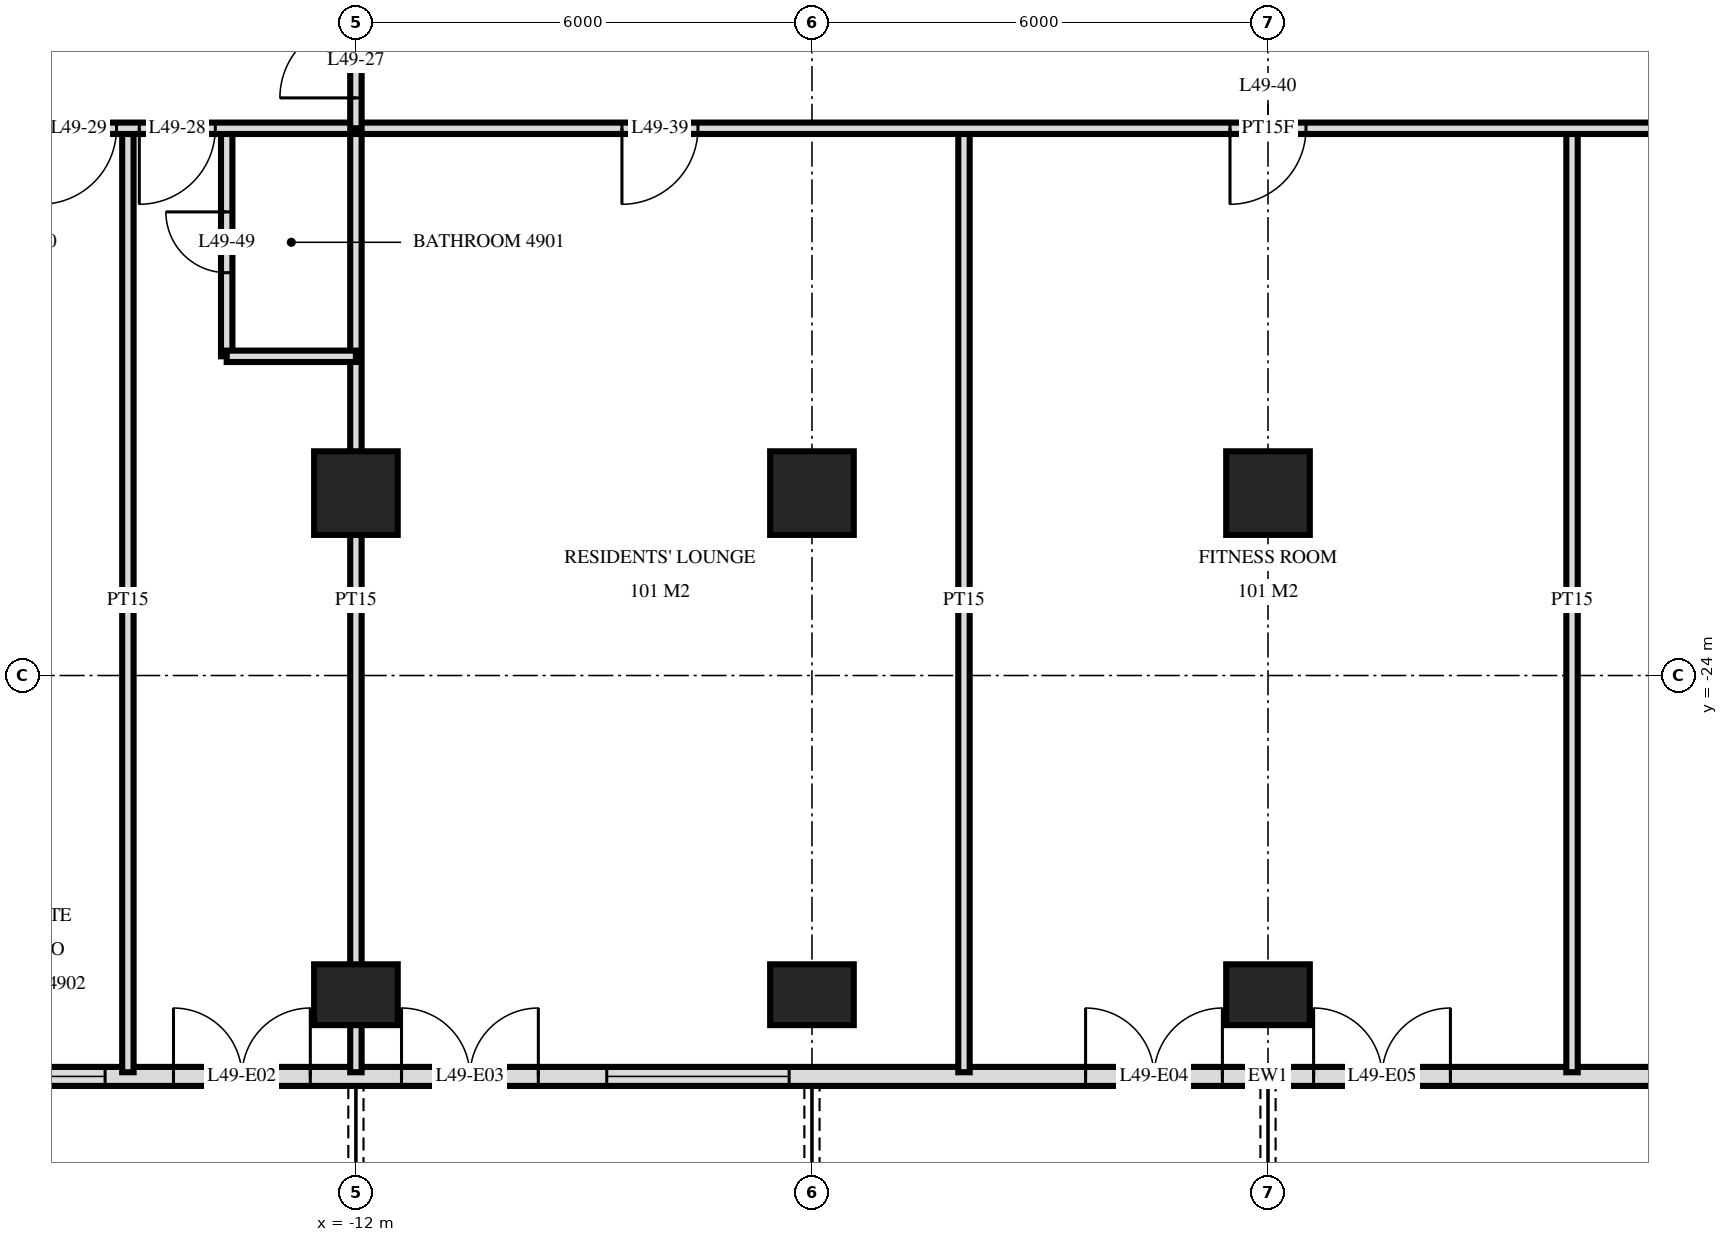
"""IFC4 building model, lengths in metres.
Left out: names, types, materials, properties, quantities, classifications, styles, units other than length and angle.
Written with IfcOpenShell. Run it as: python <this file> out.ifc"""

import sys

from ifc_helpers import new_model, si_unit, direction, frame, frame_2d, origin, origin_2d, place, context, subcontext, project, spatial, rectangle, extrude, element, fill, save


model = new_model("IFC4")
c1 = context("Model", 3, precision=1e-05, world=origin(), true_north=direction((0.0, 1.0)))
c2 = subcontext(c1, "Body", "Model", "MODEL_VIEW")
j1 = project(units=[si_unit("LENGTHUNIT", "METRE"), si_unit("PLANEANGLEUNIT", "RADIAN")], contexts=[c1])
p1 = place(None, origin())
s1 = spatial("IfcSite", under=j1, at=p1, CompositionType="ELEMENT")
p2 = place(p1, origin())
s2 = spatial("IfcBuilding", under=s1, at=p2, CompositionType="ELEMENT")
p3 = place(p2, frame((0.0, 0.0, 190.6)))
s3 = spatial("IfcBuildingStorey", under=s2, at=p3, CompositionType="ELEMENT", Elevation=190.6)
p4 = place(p3, frame((-12.0, -28.2, 0.0), z_axis=(0.0, 0.0, 1.0), x_axis=(1.0, 0.0, 0.0)))
e1 = element("IfcColumn", 1, at=p4, inside=s3, PredefinedType="COLUMN", context=c2, shape_type="SweptSolid", body=[
    extrude(rectangle(XDim=1.1, YDim=0.8, at=origin_2d()), origin(), (0.0, 0.0, 1.0), 3.5),
])
p5 = place(p3, frame((-12.0, -21.6, 0.0), z_axis=(0.0, 0.0, 1.0), x_axis=(1.0, 0.0, 0.0)))
e2 = element("IfcColumn", 2, at=p5, inside=s3, PredefinedType="COLUMN", context=c2, shape_type="SweptSolid", body=[
    extrude(rectangle(XDim=1.1, YDim=1.1, at=origin_2d()), origin(), (0.0, 0.0, 1.0), 3.5),
])
p6 = place(p3, frame((-6.0, -28.2, 0.0), z_axis=(0.0, 0.0, 1.0), x_axis=(1.0, 0.0, 0.0)))
e3 = element("IfcColumn", 3, at=p6, inside=s3, PredefinedType="COLUMN", context=c2, shape_type="SweptSolid", body=[
    extrude(rectangle(XDim=1.1, YDim=0.8, at=origin_2d()), origin(), (0.0, 0.0, 1.0), 3.5),
])
p7 = place(p3, frame((-6.0, -21.6, 0.0), z_axis=(0.0, 0.0, 1.0), x_axis=(1.0, 0.0, 0.0)))
e4 = element("IfcColumn", 4, at=p7, inside=s3, PredefinedType="COLUMN", context=c2, shape_type="SweptSolid", body=[
    extrude(rectangle(XDim=1.1, YDim=1.1, at=origin_2d()), origin(), (0.0, 0.0, 1.0), 3.5),
])
p8 = place(p3, frame((0.0, -28.2, 0.0), z_axis=(0.0, 0.0, 1.0), x_axis=(1.0, 0.0, 0.0)))
e5 = element("IfcColumn", 5, at=p8, inside=s3, PredefinedType="COLUMN", context=c2, shape_type="SweptSolid", body=[
    extrude(rectangle(XDim=1.1, YDim=0.8, at=origin_2d()), origin(), (0.0, 0.0, 1.0), 3.5),
])
p9 = place(p3, frame((0.0, -21.6, 0.0), z_axis=(0.0, 0.0, 1.0), x_axis=(1.0, 0.0, 0.0)))
e6 = element("IfcColumn", 6, at=p9, inside=s3, PredefinedType="COLUMN", context=c2, shape_type="SweptSolid", body=[
    extrude(rectangle(XDim=1.1, YDim=1.1, at=origin_2d()), origin(), (0.0, 0.0, 1.0), 3.5),
])
p10 = place(p3, frame((-22.475, -29.275, 0.0), z_axis=(0.0, 0.0, 1.0), x_axis=(1.0, 0.0, 0.0)))
e7 = element("IfcWall", 7, at=p10, inside=s3, PredefinedType="SOLIDWALL", context=c2, shape_type="SweptSolid", body=[
    extrude(rectangle(XDim=44.951, YDim=0.25, at=frame_2d((22.475, 0.0))), origin(), (0.0, 0.0, 1.0), 3.22),
])
p11 = place(p10, frame((0.575, 0.0, 0.0)))
e8 = element("IfcOpeningElement", 8, at=p11, cuts=e7, PredefinedType="OPENING", context=c2, shape_type="SweptSolid", body=[
    extrude(rectangle(XDim=1.8, YDim=2.4, at=frame_2d((0.9, 1.2))), frame((0.0, 0.135, 0.0), z_axis=(0.0, -1.0, 0.0), x_axis=(1.0, 0.0, 0.0)), (0.0, 0.0, 1.0), 0.27),
])
p12 = place(p10, frame((4.775, 0.0, 0.9)))
e9 = element("IfcOpeningElement", 9, at=p12, cuts=e7, PredefinedType="OPENING", context=c2, shape_type="SweptSolid", body=[
    extrude(rectangle(XDim=2.4, YDim=1.5, at=frame_2d((1.2, 0.75))), frame((0.0, 0.135, 0.0), z_axis=(0.0, -1.0, 0.0), x_axis=(1.0, 0.0, 0.0)), (0.0, 0.0, 1.0), 0.27),
])
p13 = place(p10, frame((8.075, 0.0, 0.0)))
e10 = element("IfcOpeningElement", 10, at=p13, cuts=e7, PredefinedType="OPENING", context=c2, shape_type="SweptSolid", body=[
    extrude(rectangle(XDim=1.8, YDim=2.4, at=frame_2d((0.9, 1.2))), frame((0.0, 0.135, 0.0), z_axis=(0.0, -1.0, 0.0), x_axis=(1.0, 0.0, 0.0)), (0.0, 0.0, 1.0), 0.27),
])
p14 = place(p10, frame((11.075, 0.0, 0.0)))
e11 = element("IfcOpeningElement", 11, at=p14, cuts=e7, PredefinedType="OPENING", context=c2, shape_type="SweptSolid", body=[
    extrude(rectangle(XDim=1.8, YDim=2.4, at=frame_2d((0.9, 1.2))), frame((0.0, 0.135, 0.0), z_axis=(0.0, -1.0, 0.0), x_axis=(1.0, 0.0, 0.0)), (0.0, 0.0, 1.0), 0.27),
])
p15 = place(p10, frame((13.775, 0.0, 0.9)))
e12 = element("IfcOpeningElement", 12, at=p15, cuts=e7, PredefinedType="OPENING", context=c2, shape_type="SweptSolid", body=[
    extrude(rectangle(XDim=2.4, YDim=1.5, at=frame_2d((1.2, 0.75))), frame((0.0, 0.135, 0.0), z_axis=(0.0, -1.0, 0.0), x_axis=(1.0, 0.0, 0.0)), (0.0, 0.0, 1.0), 0.27),
])
p16 = place(p10, frame((20.075, 0.0, 0.0)))
e13 = element("IfcOpeningElement", 13, at=p16, cuts=e7, PredefinedType="OPENING", context=c2, shape_type="SweptSolid", body=[
    extrude(rectangle(XDim=1.8, YDim=2.4, at=frame_2d((0.9, 1.2))), frame((0.0, 0.135, 0.0), z_axis=(0.0, -1.0, 0.0), x_axis=(1.0, 0.0, 0.0)), (0.0, 0.0, 1.0), 0.27),
])
p17 = place(p10, frame((23.075, 0.0, 0.0)))
e14 = element("IfcOpeningElement", 14, at=p17, cuts=e7, PredefinedType="OPENING", context=c2, shape_type="SweptSolid", body=[
    extrude(rectangle(XDim=1.8, YDim=2.4, at=frame_2d((0.9, 1.2))), frame((0.0, 0.135, 0.0), z_axis=(0.0, -1.0, 0.0), x_axis=(1.0, 0.0, 0.0)), (0.0, 0.0, 1.0), 0.27),
])
p18 = place(p10, frame((29.075, 0.0, 0.0)))
e15 = element("IfcOpeningElement", 15, at=p18, cuts=e7, PredefinedType="OPENING", context=c2, shape_type="SweptSolid", body=[
    extrude(rectangle(XDim=1.8, YDim=2.4, at=frame_2d((0.9, 1.2))), frame((0.0, 0.135, 0.0), z_axis=(0.0, -1.0, 0.0), x_axis=(1.0, 0.0, 0.0)), (0.0, 0.0, 1.0), 0.27),
])
p19 = place(p10, frame((31.775, 0.0, 0.9)))
e16 = element("IfcOpeningElement", 16, at=p19, cuts=e7, PredefinedType="OPENING", context=c2, shape_type="SweptSolid", body=[
    extrude(rectangle(XDim=2.4, YDim=1.5, at=frame_2d((1.2, 0.75))), frame((0.0, 0.135, 0.0), z_axis=(0.0, -1.0, 0.0), x_axis=(1.0, 0.0, 0.0)), (0.0, 0.0, 1.0), 0.27),
])
p20 = place(p10, frame((35.075, 0.0, 0.0)))
e17 = element("IfcOpeningElement", 17, at=p20, cuts=e7, PredefinedType="OPENING", context=c2, shape_type="SweptSolid", body=[
    extrude(rectangle(XDim=1.8, YDim=2.4, at=frame_2d((0.9, 1.2))), frame((0.0, 0.135, 0.0), z_axis=(0.0, -1.0, 0.0), x_axis=(1.0, 0.0, 0.0)), (0.0, 0.0, 1.0), 0.27),
])
p21 = place(p10, frame((37.775, 0.0, 0.9)))
e18 = element("IfcOpeningElement", 18, at=p21, cuts=e7, PredefinedType="OPENING", context=c2, shape_type="SweptSolid", body=[
    extrude(rectangle(XDim=2.4, YDim=1.5, at=frame_2d((1.2, 0.75))), frame((0.0, 0.135, 0.0), z_axis=(0.0, -1.0, 0.0), x_axis=(1.0, 0.0, 0.0)), (0.0, 0.0, 1.0), 0.27),
])
p22 = place(p10, frame((41.075, 0.0, 0.0)))
e19 = element("IfcOpeningElement", 19, at=p22, cuts=e7, PredefinedType="OPENING", context=c2, shape_type="SweptSolid", body=[
    extrude(rectangle(XDim=1.8, YDim=2.4, at=frame_2d((0.9, 1.2))), frame((0.0, 0.135, 0.0), z_axis=(0.0, -1.0, 0.0), x_axis=(1.0, 0.0, 0.0)), (0.0, 0.0, 1.0), 0.27),
])
for number, where, z_axis, x_axis in (
    (20, (4.0, -29.22, 0.0), (0.0, 0.0, 1.0), (0.0, 1.0, 0.0)),
    (21, (-4.0, -29.22, 0.0), (0.0, 0.0, 1.0), (0.0, 1.0, 0.0)),
):
    element("IfcWall", number, at=place(p3, frame(where, z_axis=z_axis, x_axis=x_axis)), inside=s3, PredefinedType="PARTITIONING", context=c2, shape_type="SweptSolid", body=[
        extrude(rectangle(XDim=12.42, YDim=0.15, at=frame_2d((6.21, 0.0))), origin(), (0.0, 0.0, 1.0), 3.22),
    ])
p23 = place(p3, frame((-12.0, -16.8, 0.0), z_axis=(0.0, 0.0, 1.0), x_axis=(0.0, 1.0, 0.0)))
e22 = element("IfcWall", 22, at=p23, inside=s3, PredefinedType="PARTITIONING", context=c2, shape_type="SweptSolid", body=[
    extrude(rectangle(XDim=1.75, YDim=0.15, at=frame_2d((0.875, 0.0))), origin(), (0.0, 0.0, 1.0), 3.22),
])
p24 = place(p23, frame((0.4, 0.0, 0.0)))
e23 = element("IfcOpeningElement", 23, at=p24, cuts=e22, PredefinedType="OPENING", context=c2, shape_type="SweptSolid", body=[
    extrude(rectangle(XDim=1.0, YDim=2.1, at=frame_2d((0.5, 1.05))), frame((0.0, 0.085, 0.0), z_axis=(0.0, -1.0, 0.0), x_axis=(1.0, 0.0, 0.0)), (0.0, 0.0, 1.0), 0.17),
])
p25 = place(p3, frame((-12.0, -29.22, 0.0), z_axis=(0.0, 0.0, 1.0), x_axis=(0.0, 1.0, 0.0)))
e24 = element("IfcWall", 24, at=p25, inside=s3, PredefinedType="PARTITIONING", context=c2, shape_type="SweptSolid", body=[
    extrude(rectangle(XDim=12.42, YDim=0.15, at=frame_2d((6.21, 0.0))), origin(), (0.0, 0.0, 1.0), 3.22),
])
p26 = place(p3, frame((-13.7, -19.8, 0.0), z_axis=(0.0, 0.0, 1.0), x_axis=(0.0, 1.0, 0.0)))
e25 = element("IfcWall", 25, at=p26, inside=s3, PredefinedType="PARTITIONING", context=c2, shape_type="SweptSolid", body=[
    extrude(rectangle(XDim=3.0, YDim=0.15, at=frame_2d((1.5, 0.0))), origin(), (0.0, 0.0, 1.0), 3.22),
])
p27 = place(p26, frame((1.1, 0.0, 0.0)))
e26 = element("IfcOpeningElement", 26, at=p27, cuts=e25, PredefinedType="OPENING", context=c2, shape_type="SweptSolid", body=[
    extrude(rectangle(XDim=0.8, YDim=2.1, at=frame_2d((0.4, 1.05))), frame((0.0, 0.085, 0.0), z_axis=(0.0, -1.0, 0.0), x_axis=(1.0, 0.0, 0.0)), (0.0, 0.0, 1.0), 0.17),
])
p28 = place(p3, frame((-15.0, -29.22, 0.0), z_axis=(0.0, 0.0, 1.0), x_axis=(0.0, 1.0, 0.0)))
e27 = element("IfcWall", 27, at=p28, inside=s3, PredefinedType="PARTITIONING", context=c2, shape_type="SweptSolid", body=[
    extrude(rectangle(XDim=12.42, YDim=0.15, at=frame_2d((6.21, 0.0))), origin(), (0.0, 0.0, 1.0), 3.22),
])
p29 = place(p3, frame((-13.7, -19.8, 0.0), z_axis=(0.0, 0.0, 1.0), x_axis=(1.0, 0.0, 0.0)))
e28 = element("IfcWall", 28, at=p29, inside=s3, PredefinedType="PARTITIONING", context=c2, shape_type="SweptSolid", body=[
    extrude(rectangle(XDim=1.7, YDim=0.15, at=frame_2d((0.85, 0.0))), origin(), (0.0, 0.0, 1.0), 3.22),
])
p30 = place(p3, frame((-26.82, -16.8, 0.0), z_axis=(0.0, 0.0, 1.0), x_axis=(1.0, 0.0, 0.0)))
e29 = element("IfcWall", 29, at=p30, inside=s3, PredefinedType="PARTITIONING", context=c2, shape_type="SweptSolid", body=[
    extrude(rectangle(XDim=53.64, YDim=0.15, at=frame_2d((26.82, 0.0))), origin(), (0.0, 0.0, 1.0), 3.22),
])
p31 = place(p30, frame((11.97, 0.0, 0.0)))
e30 = element("IfcOpeningElement", 30, at=p31, cuts=e29, PredefinedType="OPENING", context=c2, shape_type="SweptSolid", body=[
    extrude(rectangle(XDim=1.0, YDim=2.1, at=frame_2d((0.5, 1.05))), frame((0.0, 0.085, 0.0), z_axis=(0.0, -1.0, 0.0), x_axis=(1.0, 0.0, 0.0)), (0.0, 0.0, 1.0), 0.17),
])
p32 = place(p30, frame((10.67, 0.0, 0.0)))
e31 = element("IfcOpeningElement", 31, at=p32, cuts=e29, PredefinedType="OPENING", context=c2, shape_type="SweptSolid", body=[
    extrude(rectangle(XDim=1.0, YDim=2.1, at=frame_2d((0.5, 1.05))), frame((0.0, 0.085, 0.0), z_axis=(0.0, -1.0, 0.0), x_axis=(1.0, 0.0, 0.0)), (0.0, 0.0, 1.0), 0.17),
])
p33 = place(p30, frame((3.22, 0.0, 0.0)))
e32 = element("IfcOpeningElement", 32, at=p33, cuts=e29, PredefinedType="OPENING", context=c2, shape_type="SweptSolid", body=[
    extrude(rectangle(XDim=1.0, YDim=2.1, at=frame_2d((0.5, 1.05))), frame((0.0, 0.085, 0.0), z_axis=(0.0, -1.0, 0.0), x_axis=(1.0, 0.0, 0.0)), (0.0, 0.0, 1.0), 0.17),
])
p34 = place(p30, frame((5.02, 0.0, 0.0)))
e33 = element("IfcOpeningElement", 33, at=p34, cuts=e29, PredefinedType="OPENING", context=c2, shape_type="SweptSolid", body=[
    extrude(rectangle(XDim=1.0, YDim=2.1, at=frame_2d((0.5, 1.05))), frame((0.0, 0.085, 0.0), z_axis=(0.0, -1.0, 0.0), x_axis=(1.0, 0.0, 0.0)), (0.0, 0.0, 1.0), 0.17),
])
p35 = place(p30, frame((38.97, 0.0, 0.0)))
e34 = element("IfcOpeningElement", 34, at=p35, cuts=e29, PredefinedType="OPENING", context=c2, shape_type="SweptSolid", body=[
    extrude(rectangle(XDim=1.0, YDim=2.1, at=frame_2d((0.5, 1.05))), frame((0.0, 0.085, 0.0), z_axis=(0.0, -1.0, 0.0), x_axis=(1.0, 0.0, 0.0)), (0.0, 0.0, 1.0), 0.17),
])
p36 = place(p30, frame((48.72, 0.0, 0.0)))
e35 = element("IfcOpeningElement", 35, at=p36, cuts=e29, PredefinedType="OPENING", context=c2, shape_type="SweptSolid", body=[
    extrude(rectangle(XDim=1.0, YDim=2.1, at=frame_2d((0.5, 1.05))), frame((0.0, 0.085, 0.0), z_axis=(0.0, -1.0, 0.0), x_axis=(1.0, 0.0, 0.0)), (0.0, 0.0, 1.0), 0.17),
])
p37 = place(p30, frame((46.92, 0.0, 0.0)))
e36 = element("IfcOpeningElement", 36, at=p37, cuts=e29, PredefinedType="OPENING", context=c2, shape_type="SweptSolid", body=[
    extrude(rectangle(XDim=1.0, YDim=2.1, at=frame_2d((0.5, 1.05))), frame((0.0, 0.085, 0.0), z_axis=(0.0, -1.0, 0.0), x_axis=(1.0, 0.0, 0.0)), (0.0, 0.0, 1.0), 0.17),
])
p38 = place(p30, frame((18.32, 0.0, 0.0)))
e37 = element("IfcOpeningElement", 37, at=p38, cuts=e29, PredefinedType="OPENING", context=c2, shape_type="SweptSolid", body=[
    extrude(rectangle(XDim=1.0, YDim=2.1, at=frame_2d((0.5, 1.05))), frame((0.0, 0.085, 0.0), z_axis=(0.0, -1.0, 0.0), x_axis=(1.0, 0.0, 0.0)), (0.0, 0.0, 1.0), 0.17),
])
p39 = place(p30, frame((26.32, 0.0, 0.0)))
e38 = element("IfcOpeningElement", 38, at=p39, cuts=e29, PredefinedType="OPENING", context=c2, shape_type="SweptSolid", body=[
    extrude(rectangle(XDim=1.0, YDim=2.1, at=frame_2d((0.5, 1.05))), frame((0.0, 0.085, 0.0), z_axis=(0.0, -1.0, 0.0), x_axis=(1.0, 0.0, 0.0)), (0.0, 0.0, 1.0), 0.17),
])
p40 = place(p30, frame((34.32, 0.0, 0.0)))
e39 = element("IfcOpeningElement", 39, at=p40, cuts=e29, PredefinedType="OPENING", context=c2, shape_type="SweptSolid", body=[
    extrude(rectangle(XDim=1.0, YDim=2.1, at=frame_2d((0.5, 1.05))), frame((0.0, 0.085, 0.0), z_axis=(0.0, -1.0, 0.0), x_axis=(1.0, 0.0, 0.0)), (0.0, 0.0, 1.0), 0.17),
])
p41 = place(p12, origin())
e40 = element("IfcWindow", 40, at=p41, inside=s3, PartitioningType="SINGLE_PANEL", PredefinedType="WINDOW", context=c2, shape_type="SweptSolid", body=[
    extrude(rectangle(XDim=2.4, YDim=1.5, at=frame_2d((1.2, 0.75))), frame((0.0, 0.03, 0.0), z_axis=(0.0, -1.0, 0.0), x_axis=(1.0, 0.0, 0.0)), (0.0, 0.0, 1.0), 0.06),
])
fill(e9, e40)
p42 = place(p13, origin())
e41 = element("IfcDoor", 41, at=p42, inside=s3, OperationType="DOUBLE_DOOR_SINGLE_SWING", PredefinedType="DOOR", context=c2, shape_type="SweptSolid", body=[
    extrude(rectangle(XDim=1.8, YDim=2.4, at=frame_2d((0.9, 1.2))), frame((0.0, 0.025, 0.0), z_axis=(0.0, -1.0, 0.0), x_axis=(1.0, 0.0, 0.0)), (0.0, 0.0, 1.0), 0.05),
])
fill(e10, e41)
p43 = place(p14, origin())
e42 = element("IfcDoor", 42, at=p43, inside=s3, OperationType="DOUBLE_DOOR_SINGLE_SWING", PredefinedType="DOOR", context=c2, shape_type="SweptSolid", body=[
    extrude(rectangle(XDim=1.8, YDim=2.4, at=frame_2d((0.9, 1.2))), frame((0.0, 0.025, 0.0), z_axis=(0.0, -1.0, 0.0), x_axis=(1.0, 0.0, 0.0)), (0.0, 0.0, 1.0), 0.05),
])
fill(e11, e42)
p44 = place(p15, origin())
e43 = element("IfcWindow", 43, at=p44, inside=s3, PartitioningType="SINGLE_PANEL", PredefinedType="WINDOW", context=c2, shape_type="SweptSolid", body=[
    extrude(rectangle(XDim=2.4, YDim=1.5, at=frame_2d((1.2, 0.75))), frame((0.0, 0.03, 0.0), z_axis=(0.0, -1.0, 0.0), x_axis=(1.0, 0.0, 0.0)), (0.0, 0.0, 1.0), 0.06),
])
fill(e12, e43)
p45 = place(p16, origin())
e44 = element("IfcDoor", 44, at=p45, inside=s3, OperationType="DOUBLE_DOOR_SINGLE_SWING", PredefinedType="DOOR", context=c2, shape_type="SweptSolid", body=[
    extrude(rectangle(XDim=1.8, YDim=2.4, at=frame_2d((0.9, 1.2))), frame((0.0, 0.025, 0.0), z_axis=(0.0, -1.0, 0.0), x_axis=(1.0, 0.0, 0.0)), (0.0, 0.0, 1.0), 0.05),
])
fill(e13, e44)
p46 = place(p17, origin())
e45 = element("IfcDoor", 45, at=p46, inside=s3, OperationType="DOUBLE_DOOR_SINGLE_SWING", PredefinedType="DOOR", context=c2, shape_type="SweptSolid", body=[
    extrude(rectangle(XDim=1.8, YDim=2.4, at=frame_2d((0.9, 1.2))), frame((0.0, 0.025, 0.0), z_axis=(0.0, -1.0, 0.0), x_axis=(1.0, 0.0, 0.0)), (0.0, 0.0, 1.0), 0.05),
])
fill(e14, e45)
p47 = place(p24, origin())
e46 = element("IfcDoor", 46, at=p47, inside=s3, OperationType="SINGLE_SWING_RIGHT", PredefinedType="DOOR", context=c2, shape_type="SweptSolid", body=[
    extrude(rectangle(XDim=1.0, YDim=2.1, at=frame_2d((0.5, 1.05))), frame((0.0, 0.025, 0.0), z_axis=(0.0, -1.0, 0.0), x_axis=(1.0, 0.0, 0.0)), (0.0, 0.0, 1.0), 0.05),
])
fill(e23, e46)
p48 = place(p31, frame((0.5, 0.0, 0.0), z_axis=(0.0, 0.0, 1.0), x_axis=(-1.0, 0.0, 0.0)))
e47 = element("IfcDoor", 47, at=p48, inside=s3, OperationType="SINGLE_SWING_LEFT", PredefinedType="DOOR", context=c2, shape_type="SweptSolid", body=[
    extrude(rectangle(XDim=1.0, YDim=2.1, at=frame_2d((0.0, 1.05))), frame((0.0, -0.025, 0.0), z_axis=(0.0, 1.0, 0.0), x_axis=(-1.0, 0.0, 0.0)), (0.0, 0.0, 1.0), 0.05),
])
fill(e30, e47)
p49 = place(p32, frame((0.5, 0.0, 0.0), z_axis=(0.0, 0.0, 1.0), x_axis=(-1.0, 0.0, 0.0)))
e48 = element("IfcDoor", 48, at=p49, inside=s3, OperationType="SINGLE_SWING_LEFT", PredefinedType="DOOR", context=c2, shape_type="SweptSolid", body=[
    extrude(rectangle(XDim=1.0, YDim=2.1, at=frame_2d((0.0, 1.05))), frame((0.0, -0.025, 0.0), z_axis=(0.0, 1.0, 0.0), x_axis=(-1.0, 0.0, 0.0)), (0.0, 0.0, 1.0), 0.05),
])
fill(e31, e48)
p50 = place(p38, frame((0.5, 0.0, 0.0), z_axis=(0.0, 0.0, 1.0), x_axis=(-1.0, 0.0, 0.0)))
e49 = element("IfcDoor", 49, at=p50, inside=s3, OperationType="SINGLE_SWING_LEFT", PredefinedType="DOOR", context=c2, shape_type="SweptSolid", body=[
    extrude(rectangle(XDim=1.0, YDim=2.1, at=frame_2d((0.0, 1.05))), frame((0.0, -0.025, 0.0), z_axis=(0.0, 1.0, 0.0), x_axis=(-1.0, 0.0, 0.0)), (0.0, 0.0, 1.0), 0.05),
])
fill(e37, e49)
p51 = place(p39, frame((0.5, 0.0, 0.0), z_axis=(0.0, 0.0, 1.0), x_axis=(-1.0, 0.0, 0.0)))
e50 = element("IfcDoor", 50, at=p51, inside=s3, OperationType="SINGLE_SWING_LEFT", PredefinedType="DOOR", context=c2, shape_type="SweptSolid", body=[
    extrude(rectangle(XDim=1.0, YDim=2.1, at=frame_2d((0.0, 1.05))), frame((0.0, -0.025, 0.0), z_axis=(0.0, 1.0, 0.0), x_axis=(-1.0, 0.0, 0.0)), (0.0, 0.0, 1.0), 0.05),
])
fill(e38, e50)
p52 = place(p27, origin())
e51 = element("IfcDoor", 51, at=p52, inside=s3, OperationType="SINGLE_SWING_LEFT", PredefinedType="DOOR", context=c2, shape_type="SweptSolid", body=[
    extrude(rectangle(XDim=0.8, YDim=2.1, at=frame_2d((0.4, 1.05))), frame((0.0, 0.025, 0.0), z_axis=(0.0, -1.0, 0.0), x_axis=(1.0, 0.0, 0.0)), (0.0, 0.0, 1.0), 0.05),
])
fill(e26, e51)
save(model, sys.argv[1])
